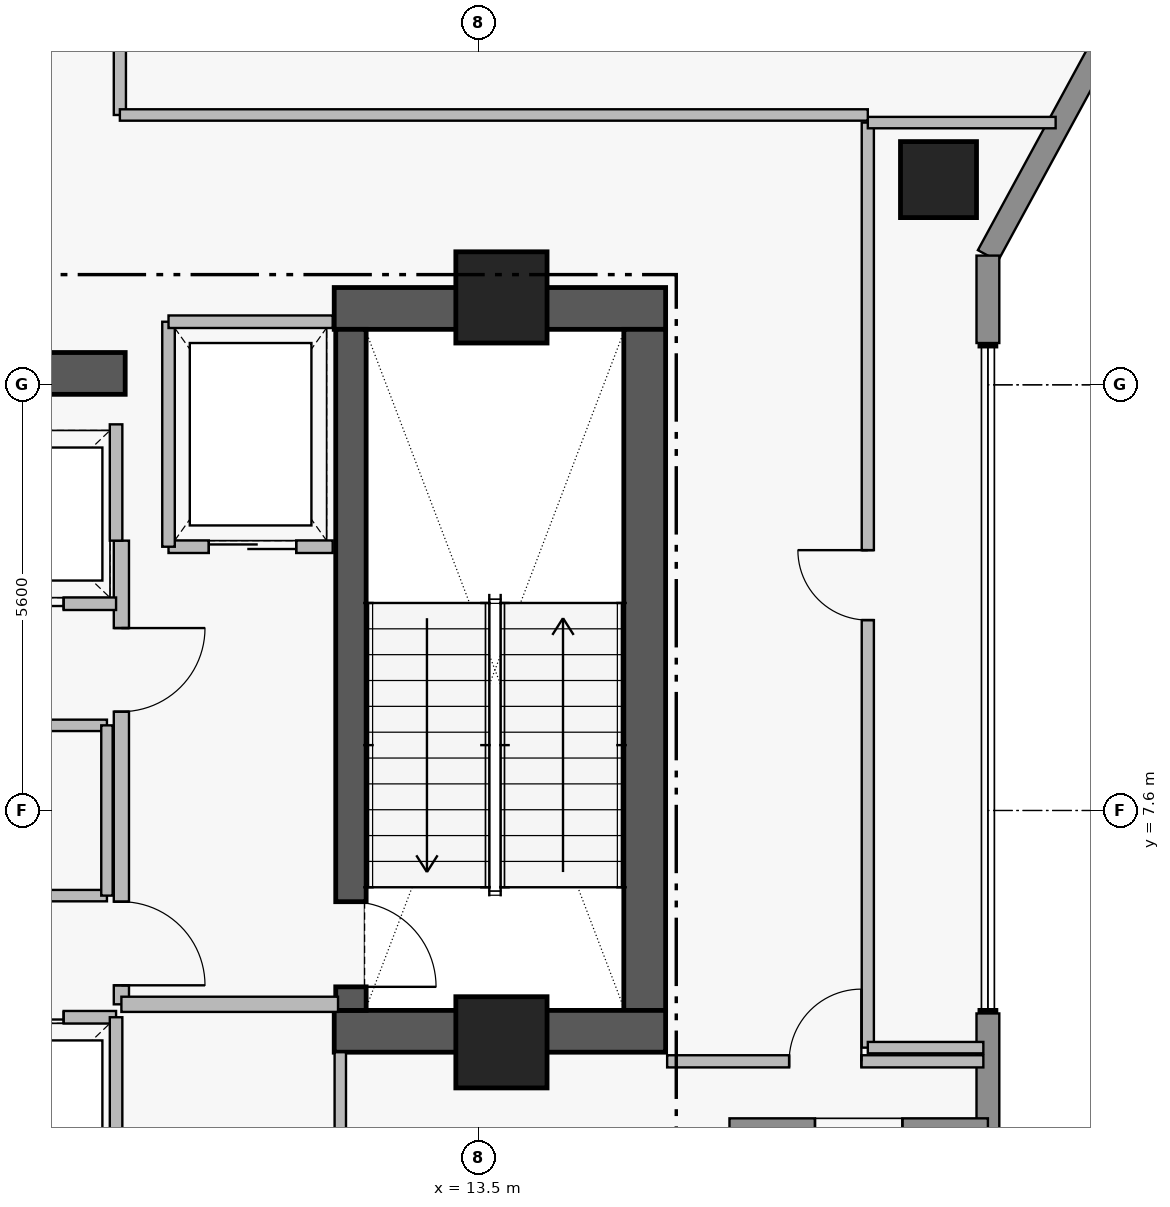
"""IFC4 building model, lengths in metres.
Left out: names, types, materials, properties, quantities, classifications, styles, units other than length and angle.
Written with IfcOpenShell. Run it as: python <this file> out.ifc"""

import sys

from ifc_helpers import new_model, si_unit, direction, frame, frame_2d, origin, origin_2d, place, context, subcontext, project, spatial, rectangle, extrude, element, fill, save


model = new_model("IFC4")
c1 = context("Model", 3, precision=1e-05, world=origin(), true_north=direction((0.0, 1.0)))
c2 = subcontext(c1, "Body", "Model", "MODEL_VIEW")
j1 = project(units=[si_unit("LENGTHUNIT", "METRE"), si_unit("PLANEANGLEUNIT", "RADIAN")], contexts=[c1])
p1 = place(None, origin())
s1 = spatial("IfcSite", under=j1, at=p1, CompositionType="ELEMENT")
p2 = place(p1, origin())
s2 = spatial("IfcBuilding", under=s1, at=p2, CompositionType="ELEMENT")
p3 = place(p2, frame((0.0, 0.0, 292.85)))
s3 = spatial("IfcBuildingStorey", under=s2, at=p3, CompositionType="ELEMENT", Elevation=292.85)
p4 = place(p3, frame((11.6, 14.205, 0.0), z_axis=(0.0, 0.0, 1.0), x_axis=(1.0, 0.0, 0.0)))
e1 = element("IfcWall", 1, at=p4, inside=s3, PredefinedType="SHEAR", context=c2, shape_type="SweptSolid", body=[
    extrude(rectangle(XDim=4.36, YDim=0.55, at=frame_2d((2.18, 0.0))), origin(), (0.0, 0.0, 1.0), 4.21),
])
p5 = place(p3, frame((15.685, 4.97, 0.0), z_axis=(0.0, 0.0, 1.0), x_axis=(0.0, 1.0, 0.0)))
e2 = element("IfcWall", 2, at=p5, inside=s3, PredefinedType="SHEAR", context=c2, shape_type="SweptSolid", body=[
    extrude(rectangle(XDim=8.96, YDim=0.55, at=frame_2d((4.48, 0.0))), origin(), (0.0, 0.0, 1.0), 4.21),
])
p6 = place(p3, frame((11.6, 4.695, 0.0), z_axis=(0.0, 0.0, 1.0), x_axis=(1.0, 0.0, 0.0)))
e3 = element("IfcWall", 3, at=p6, inside=s3, PredefinedType="SHEAR", context=c2, shape_type="SweptSolid", body=[
    extrude(rectangle(XDim=4.36, YDim=0.55, at=frame_2d((2.18, 0.0))), origin(), (0.0, 0.0, 1.0), 4.21),
])
p7 = place(p3, frame((1.25, 13.35, 0.0), z_axis=(0.0, 0.0, 1.0), x_axis=(1.0, 0.0, 0.0)))
e4 = element("IfcWall", 4, at=p7, inside=s3, PredefinedType="SHEAR", context=c2, shape_type="SweptSolid", body=[
    extrude(rectangle(XDim=7.6, YDim=0.55, at=frame_2d((3.8, 0.0))), origin(), (0.0, 0.0, 1.0), 4.16),
])
p8 = place(p3, frame((11.82, 13.93, 0.0), z_axis=(0.0, 0.0, 1.0), x_axis=(0.0, -1.0, 0.0)))
e5 = element("IfcWall", 5, at=p8, inside=s3, PredefinedType="SHEAR", context=c2, shape_type="SweptSolid", body=[
    extrude(rectangle(XDim=8.96, YDim=0.4, at=frame_2d((4.48, 0.0))), origin(), (0.0, 0.0, 1.0), 4.21),
])
p9 = place(p8, frame((7.53, 0.0, 0.0)))
e6 = element("IfcOpeningElement", 6, at=p9, cuts=e5, PredefinedType="OPENING", context=c2, shape_type="SweptSolid", body=[
    extrude(rectangle(XDim=1.12, YDim=2.22, at=frame_2d((0.56, 1.11))), frame((0.0, 0.21, 0.0), z_axis=(0.0, -1.0, 0.0), x_axis=(1.0, 0.0, 0.0)), (0.0, 0.0, 1.0), 0.42),
])
for number, where, z_axis, x_axis in (
    (7, (13.8, 14.35, 0.0), (0.0, 0.0, 1.0), (1.0, 0.0, 0.0)),
    (8, (13.8, 4.55, 0.0), (0.0, 0.0, 1.0), (1.0, 0.0, 0.0)),
):
    element("IfcColumn", number, at=place(p3, frame(where, z_axis=z_axis, x_axis=x_axis)), inside=s3, PredefinedType="COLUMN", context=c2, shape_type="SweptSolid", body=[
        extrude(rectangle(XDim=1.2, YDim=1.2, at=origin_2d()), origin(), (0.0, 0.0, 1.0), 4.4),
    ])
p10 = place(p3, frame((19.55, 15.9, 0.0), z_axis=(0.0, 0.0, 1.0), x_axis=(1.0, 0.0, 0.0)))
e9 = element("IfcColumn", 9, at=p10, inside=s3, PredefinedType="COLUMN", context=c2, shape_type="SweptSolid", body=[
    extrude(rectangle(XDim=1.0, YDim=1.0, at=origin_2d()), origin(), (0.0, 0.0, 1.0), 4.4),
])
p11 = place(p3, frame((22.7, 19.5, 0.0), z_axis=(0.0, 0.0, 1.0), x_axis=(-0.477505494629, -0.878628762675, 0.0)))
e10 = element("IfcWall", 10, at=p11, inside=s3, PredefinedType="STANDARD", context=c2, shape_type="SweptSolid", body=[
    extrude(rectangle(XDim=5.236, YDim=0.3, at=frame_2d((2.618, 0.0))), origin(), (0.0, 0.0, 1.0), 4.16),
])
p12 = place(p11, frame((1.051, 0.0, 1.25)))
e11 = element("IfcOpeningElement", 11, at=p12, cuts=e10, PredefinedType="OPENING", context=c2, shape_type="SweptSolid", body=[
    extrude(rectangle(XDim=1.15, YDim=1.55, at=frame_2d((0.575, 0.775))), frame((0.0, 0.16, 0.0), z_axis=(0.0, -1.0, 0.0), x_axis=(1.0, 0.0, 0.0)), (0.0, 0.0, 1.0), 0.32),
])
p13 = place(p3, frame((20.2, 14.9, 0.0), z_axis=(0.0, 0.0, 1.0), x_axis=(0.0, -1.0, 0.0)))
e12 = element("IfcWall", 12, at=p13, inside=s3, PredefinedType="STANDARD", context=c2, shape_type="SweptSolid", body=[
    extrude(rectangle(XDim=1.15, YDim=0.3, at=frame_2d((0.575, 0.0))), origin(), (0.0, 0.0, 1.0), 4.16),
])
p14 = place(p3, frame((20.2, 4.93, 0.0), z_axis=(0.0, 0.0, 1.0), x_axis=(0.0, -1.0, 0.0)))
e13 = element("IfcWall", 13, at=p14, inside=s3, PredefinedType="STANDARD", context=c2, shape_type="SweptSolid", body=[
    extrude(rectangle(XDim=1.53, YDim=0.3, at=frame_2d((0.765, 0.0))), origin(), (0.0, 0.0, 1.0), 4.16),
])
p15 = place(p3, frame((20.2, 3.4, 0.0), z_axis=(0.0, 0.0, 1.0), x_axis=(-1.0, 0.0, 0.0)))
e14 = element("IfcWall", 14, at=p15, inside=s3, PredefinedType="STANDARD", context=c2, shape_type="SweptSolid", body=[
    extrude(rectangle(XDim=3.4, YDim=0.3, at=frame_2d((1.7, 0.0))), origin(), (0.0, 0.0, 1.0), 4.16),
])
p16 = place(p15, frame((1.125, 0.0, 1.25)))
e15 = element("IfcOpeningElement", 15, at=p16, cuts=e14, PredefinedType="OPENING", context=c2, shape_type="SweptSolid", body=[
    extrude(rectangle(XDim=1.15, YDim=1.55, at=frame_2d((0.575, 0.775))), frame((0.0, 0.16, 0.0), z_axis=(0.0, -1.0, 0.0), x_axis=(1.0, 0.0, 0.0)), (0.0, 0.0, 1.0), 0.32),
])
p17 = place(p3, frame((8.8, 11.15, 0.0), z_axis=(0.0, 0.0, 1.0), x_axis=(0.0, -1.0, 0.0)))
e16 = element("IfcWall", 16, at=p17, inside=s3, PredefinedType="PARTITIONING", context=c2, shape_type="SweptSolid", body=[
    extrude(rectangle(XDim=6.1, YDim=0.2, at=frame_2d((3.05, 0.0))), origin(), (0.0, 0.0, 1.0), 4.16),
])
p18 = place(p17, frame((1.15, 0.0, 0.0)))
e17 = element("IfcOpeningElement", 17, at=p18, cuts=e16, PredefinedType="OPENING", context=c2, shape_type="SweptSolid", body=[
    extrude(rectangle(XDim=1.1, YDim=2.2, at=frame_2d((0.55, 1.1))), frame((0.0, 0.11, 0.0), z_axis=(0.0, -1.0, 0.0), x_axis=(1.0, 0.0, 0.0)), (0.0, 0.0, 1.0), 0.22),
])
p19 = place(p17, frame((4.75, 0.0, 0.0)))
e18 = element("IfcOpeningElement", 18, at=p19, cuts=e16, PredefinedType="OPENING", context=c2, shape_type="SweptSolid", body=[
    extrude(rectangle(XDim=1.1, YDim=2.2, at=frame_2d((0.55, 1.1))), frame((0.0, 0.11, 0.0), z_axis=(0.0, -1.0, 0.0), x_axis=(1.0, 0.0, 0.0)), (0.0, 0.0, 1.0), 0.22),
])
p20 = place(p3, frame((9.42, 11.07, 0.0), z_axis=(0.0, 0.0, 1.0), x_axis=(1.0, 0.0, 0.0)))
e19 = element("IfcWall", 19, at=p20, inside=s3, PredefinedType="PARTITIONING", context=c2, shape_type="SweptSolid", body=[
    extrude(rectangle(XDim=2.16, YDim=0.165, at=frame_2d((1.08, 0.0))), origin(), (0.0, 0.0, 1.0), 4.16),
])
p21 = place(p20, frame((0.53, 0.0, 0.0)))
e20 = element("IfcOpeningElement", 20, at=p21, cuts=e19, PredefinedType="OPENING", context=c2, shape_type="SweptSolid", body=[
    extrude(rectangle(XDim=1.15, YDim=2.25, at=frame_2d((0.575, 1.125))), frame((0.0, 0.093, 0.0), z_axis=(0.0, -1.0, 0.0), x_axis=(1.0, 0.0, 0.0)), (0.0, 0.0, 1.0), 0.185),
])
p22 = place(p3, frame((6.25, 4.88, 0.0), z_axis=(0.0, 0.0, 1.0), x_axis=(1.0, 0.0, 0.0)))
e21 = element("IfcWall", 21, at=p22, inside=s3, PredefinedType="PARTITIONING", context=c2, shape_type="SweptSolid", body=[
    extrude(rectangle(XDim=2.48, YDim=0.165, at=frame_2d((1.24, 0.0))), origin(), (0.0, 0.0, 1.0), 4.16),
])
p23 = place(p22, frame((0.69, 0.0, 0.0)))
e22 = element("IfcOpeningElement", 22, at=p23, cuts=e21, PredefinedType="OPENING", context=c2, shape_type="SweptSolid", body=[
    extrude(rectangle(XDim=1.1, YDim=2.25, at=frame_2d((0.55, 1.125))), frame((0.0, 0.093, 0.0), z_axis=(0.0, -1.0, 0.0), x_axis=(1.0, 0.0, 0.0)), (0.0, 0.0, 1.0), 0.185),
])
p24 = place(p3, frame((6.25, 10.32, 0.0), z_axis=(0.0, 0.0, 1.0), x_axis=(1.0, 0.0, 0.0)))
e23 = element("IfcWall", 23, at=p24, inside=s3, PredefinedType="PARTITIONING", context=c2, shape_type="SweptSolid", body=[
    extrude(rectangle(XDim=2.48, YDim=0.165, at=frame_2d((1.24, 0.0))), origin(), (0.0, 0.0, 1.0), 4.16),
])
p25 = place(p24, frame((0.69, 0.0, 0.0)))
e24 = element("IfcOpeningElement", 24, at=p25, cuts=e23, PredefinedType="OPENING", context=c2, shape_type="SweptSolid", body=[
    extrude(rectangle(XDim=1.1, YDim=2.25, at=frame_2d((0.55, 1.125))), frame((0.0, 0.093, 0.0), z_axis=(0.0, -1.0, 0.0), x_axis=(1.0, 0.0, 0.0)), (0.0, 0.0, 1.0), 0.185),
])
p26 = place(p3, frame((4.37, 6.48, 0.0), z_axis=(0.0, 0.0, 1.0), x_axis=(1.0, 0.0, 0.0)))
e25 = element("IfcWall", 25, at=p26, inside=s3, PredefinedType="PARTITIONING", context=c2, shape_type="SweptSolid", body=[
    extrude(rectangle(XDim=4.24, YDim=0.15, at=frame_2d((2.12, 0.0))), origin(), (0.0, 0.0, 1.0), 4.16),
])
p27 = place(p26, frame((1.67, 0.0, 0.0)))
e26 = element("IfcOpeningElement", 26, at=p27, cuts=e25, PredefinedType="OPENING", context=c2, shape_type="SweptSolid", body=[
    extrude(rectangle(XDim=0.9, YDim=2.15, at=frame_2d((0.45, 1.075))), frame((0.0, 0.085, 0.0), z_axis=(0.0, -1.0, 0.0), x_axis=(1.0, 0.0, 0.0)), (0.0, 0.0, 1.0), 0.17),
])
p28 = place(p3, frame((15.98, 4.3, 0.0), z_axis=(0.0, 0.0, 1.0), x_axis=(1.0, 0.0, 0.0)))
e27 = element("IfcWall", 27, at=p28, inside=s3, PredefinedType="PARTITIONING", context=c2, shape_type="SweptSolid", body=[
    extrude(rectangle(XDim=4.16, YDim=0.16, at=frame_2d((2.08, 0.0))), origin(), (0.0, 0.0, 1.0), 4.16),
])
p29 = place(p28, frame((1.605, 0.0, 0.0)))
e28 = element("IfcOpeningElement", 28, at=p29, cuts=e27, PredefinedType="OPENING", context=c2, shape_type="SweptSolid", body=[
    extrude(rectangle(XDim=0.95, YDim=2.15, at=frame_2d((0.475, 1.075))), frame((0.0, 0.09, 0.0), z_axis=(0.0, -1.0, 0.0), x_axis=(1.0, 0.0, 0.0)), (0.0, 0.0, 1.0), 0.18),
])
p30 = place(p3, frame((18.62, 4.48, 0.0), z_axis=(0.0, 0.0, 1.0), x_axis=(0.0, 1.0, 0.0)))
e29 = element("IfcWall", 29, at=p30, inside=s3, PredefinedType="PARTITIONING", context=c2, shape_type="SweptSolid", body=[
    extrude(rectangle(XDim=12.17, YDim=0.16, at=frame_2d((6.085, 0.0))), origin(), (0.0, 0.0, 1.0), 4.16),
])
p31 = place(p30, frame((5.625, 0.0, 0.0)))
e30 = element("IfcOpeningElement", 30, at=p31, cuts=e29, PredefinedType="OPENING", context=c2, shape_type="SweptSolid", body=[
    extrude(rectangle(XDim=0.92, YDim=2.12, at=frame_2d((0.46, 1.06))), frame((0.0, 0.09, 0.0), z_axis=(0.0, -1.0, 0.0), x_axis=(1.0, 0.0, 0.0)), (0.0, 0.0, 1.0), 0.18),
])
p32 = place(p3, frame((8.78, 16.75, 0.0), z_axis=(0.0, 0.0, 1.0), x_axis=(0.0, 1.0, 0.0)))
e31 = element("IfcWall", 31, at=p32, inside=s3, PredefinedType="PARTITIONING", context=c2, shape_type="SweptSolid", body=[
    extrude(rectangle(XDim=6.85, YDim=0.16, at=frame_2d((3.425, 0.0))), origin(), (0.0, 0.0, 1.0), 4.16),
])
p33 = place(p32, frame((2.885, 0.0, 0.0)))
e32 = element("IfcOpeningElement", 32, at=p33, cuts=e31, PredefinedType="OPENING", context=c2, shape_type="SweptSolid", body=[
    extrude(rectangle(XDim=1.08, YDim=2.18, at=frame_2d((0.54, 1.09))), frame((0.0, 0.09, 0.0), z_axis=(0.0, -1.0, 0.0), x_axis=(1.0, 0.0, 0.0)), (0.0, 0.0, 1.0), 0.18),
])
p34 = place(p3, frame((8.8, 5.05, 0.0), z_axis=(0.0, 0.0, 1.0), x_axis=(1.0, 0.0, 0.0)))
e33 = element("IfcWall", 33, at=p34, inside=s3, PredefinedType="PARTITIONING", context=c2, shape_type="SweptSolid", body=[
    extrude(rectangle(XDim=2.85, YDim=0.2, at=frame_2d((1.425, 0.0))), origin(), (0.0, 0.0, 1.0), 4.16),
])
p35 = place(p3, frame((9.42, 11.07, 0.0), z_axis=(0.0, 0.0, 1.0), x_axis=(0.0, 1.0, 0.0)))
e34 = element("IfcWall", 34, at=p35, inside=s3, PredefinedType="PARTITIONING", context=c2, shape_type="SweptSolid", body=[
    extrude(rectangle(XDim=2.96, YDim=0.165, at=frame_2d((1.48, 0.0))), origin(), (0.0, 0.0, 1.0), 4.16),
])
p36 = place(p3, frame((9.42, 14.03, 0.0), z_axis=(0.0, 0.0, 1.0), x_axis=(1.0, 0.0, 0.0)))
e35 = element("IfcWall", 35, at=p36, inside=s3, PredefinedType="PARTITIONING", context=c2, shape_type="SweptSolid", body=[
    extrude(rectangle(XDim=2.16, YDim=0.165, at=frame_2d((1.08, 0.0))), origin(), (0.0, 0.0, 1.0), 4.16),
])
p37 = place(p3, frame((8.73, 2.52, 0.0), z_axis=(0.0, 0.0, 1.0), x_axis=(0.0, 1.0, 0.0)))
e36 = element("IfcWall", 36, at=p37, inside=s3, PredefinedType="PARTITIONING", context=c2, shape_type="SweptSolid", body=[
    extrude(rectangle(XDim=2.36, YDim=0.165, at=frame_2d((1.18, 0.0))), origin(), (0.0, 0.0, 1.0), 4.16),
])
p38 = place(p3, frame((8.73, 11.15, 0.0), z_axis=(0.0, 0.0, 1.0), x_axis=(0.0, 1.0, 0.0)))
e37 = element("IfcWall", 37, at=p38, inside=s3, PredefinedType="PARTITIONING", context=c2, shape_type="SweptSolid", body=[
    extrude(rectangle(XDim=1.53, YDim=0.165, at=frame_2d((0.765, 0.0))), origin(), (0.0, 0.0, 1.0), 4.16),
])
p39 = place(p3, frame((4.37, 8.72, 0.0), z_axis=(0.0, 0.0, 1.0), x_axis=(1.0, 0.0, 0.0)))
e38 = element("IfcWall", 38, at=p39, inside=s3, PredefinedType="PARTITIONING", context=c2, shape_type="SweptSolid", body=[
    extrude(rectangle(XDim=4.24, YDim=0.15, at=frame_2d((2.12, 0.0))), origin(), (0.0, 0.0, 1.0), 4.16),
])
p40 = place(p3, frame((8.61, 6.48, 0.0), z_axis=(0.0, 0.0, 1.0), x_axis=(0.0, 1.0, 0.0)))
e39 = element("IfcWall", 39, at=p40, inside=s3, PredefinedType="PARTITIONING", context=c2, shape_type="SweptSolid", body=[
    extrude(rectangle(XDim=2.24, YDim=0.15, at=frame_2d((1.12, 0.0))), origin(), (0.0, 0.0, 1.0), 4.16),
])
p41 = place(p3, frame((11.68, 1.72, 0.0), z_axis=(0.0, 0.0, 1.0), x_axis=(0.0, 1.0, 0.0)))
e40 = element("IfcWall", 40, at=p41, inside=s3, PredefinedType="PARTITIONING", context=c2, shape_type="SweptSolid", body=[
    extrude(rectangle(XDim=2.7, YDim=0.15, at=frame_2d((1.35, 0.0))), origin(), (0.0, 0.0, 1.0), 4.16),
])
p42 = place(p3, frame((18.62, 4.48, 0.0), z_axis=(0.0, 0.0, 1.0), x_axis=(1.0, 0.0, 0.0)))
e41 = element("IfcWall", 41, at=p42, inside=s3, PredefinedType="PARTITIONING", context=c2, shape_type="SweptSolid", body=[
    extrude(rectangle(XDim=1.52, YDim=0.15, at=frame_2d((0.76, 0.0))), origin(), (0.0, 0.0, 1.0), 4.16),
])
p43 = place(p3, frame((18.62, 16.65, 0.0), z_axis=(0.0, 0.0, 1.0), x_axis=(1.0, 0.0, 0.0)))
e42 = element("IfcWall", 42, at=p43, inside=s3, PredefinedType="PARTITIONING", context=c2, shape_type="SweptSolid", body=[
    extrude(rectangle(XDim=2.471, YDim=0.15, at=frame_2d((1.235, 0.0))), origin(), (0.0, 0.0, 1.0), 4.16),
])
p44 = place(p3, frame((8.78, 16.75, 0.0), z_axis=(0.0, 0.0, 1.0), x_axis=(1.0, 0.0, 0.0)))
e43 = element("IfcWall", 43, at=p44, inside=s3, PredefinedType="PARTITIONING", context=c2, shape_type="SweptSolid", body=[
    extrude(rectangle(XDim=9.84, YDim=0.15, at=frame_2d((4.92, 0.0))), origin(), (0.0, 0.0, 1.0), 4.16),
])
p45 = place(p16, origin())
e44 = element("IfcWindow", 44, at=p45, inside=s3, PartitioningType="SINGLE_PANEL", PredefinedType="WINDOW", context=c2, shape_type="SweptSolid", body=[
    extrude(rectangle(XDim=1.15, YDim=1.55, at=frame_2d((0.575, 0.775))), frame((0.0, 0.03, 0.0), z_axis=(0.0, -1.0, 0.0), x_axis=(1.0, 0.0, 0.0)), (0.0, 0.0, 1.0), 0.06),
])
fill(e15, e44)
p46 = place(p9, origin())
e45 = element("IfcDoor", 45, at=p46, inside=s3, OperationType="SINGLE_SWING_RIGHT", PredefinedType="DOOR", context=c2, shape_type="SweptSolid", body=[
    extrude(rectangle(XDim=1.12, YDim=2.22, at=frame_2d((0.56, 1.11))), frame((0.0, 0.025, 0.0), z_axis=(0.0, -1.0, 0.0), x_axis=(1.0, 0.0, 0.0)), (0.0, 0.0, 1.0), 0.05),
])
fill(e6, e45)
p47 = place(p18, origin())
e46 = element("IfcDoor", 46, at=p47, inside=s3, OperationType="SINGLE_SWING_LEFT", PredefinedType="DOOR", context=c2, shape_type="SweptSolid", body=[
    extrude(rectangle(XDim=1.1, YDim=2.2, at=frame_2d((0.55, 1.1))), frame((0.0, 0.025, 0.0), z_axis=(0.0, -1.0, 0.0), x_axis=(1.0, 0.0, 0.0)), (0.0, 0.0, 1.0), 0.05),
])
fill(e17, e46)
p48 = place(p19, origin())
e47 = element("IfcDoor", 47, at=p48, inside=s3, OperationType="SINGLE_SWING_RIGHT", PredefinedType="DOOR", context=c2, shape_type="SweptSolid", body=[
    extrude(rectangle(XDim=1.1, YDim=2.2, at=frame_2d((0.55, 1.1))), frame((0.0, 0.025, 0.0), z_axis=(0.0, -1.0, 0.0), x_axis=(1.0, 0.0, 0.0)), (0.0, 0.0, 1.0), 0.05),
])
fill(e18, e47)
p49 = place(p21, origin())
e48 = element("IfcDoor", 48, at=p49, inside=s3, OperationType="SLIDING_TO_LEFT", PredefinedType="DOOR", context=c2, shape_type="SweptSolid", body=[
    extrude(rectangle(XDim=1.15, YDim=2.25, at=frame_2d((0.575, 1.125))), frame((0.0, 0.025, 0.0), z_axis=(0.0, -1.0, 0.0), x_axis=(1.0, 0.0, 0.0)), (0.0, 0.0, 1.0), 0.05),
])
fill(e20, e48)
p50 = place(p23, origin())
e49 = element("IfcDoor", 49, at=p50, inside=s3, OperationType="SLIDING_TO_LEFT", PredefinedType="DOOR", context=c2, shape_type="SweptSolid", body=[
    extrude(rectangle(XDim=1.1, YDim=2.25, at=frame_2d((0.55, 1.125))), frame((0.0, 0.025, 0.0), z_axis=(0.0, -1.0, 0.0), x_axis=(1.0, 0.0, 0.0)), (0.0, 0.0, 1.0), 0.05),
])
fill(e22, e49)
p51 = place(p25, origin())
e50 = element("IfcDoor", 50, at=p51, inside=s3, OperationType="SLIDING_TO_LEFT", PredefinedType="DOOR", context=c2, shape_type="SweptSolid", body=[
    extrude(rectangle(XDim=1.1, YDim=2.25, at=frame_2d((0.55, 1.125))), frame((0.0, 0.025, 0.0), z_axis=(0.0, -1.0, 0.0), x_axis=(1.0, 0.0, 0.0)), (0.0, 0.0, 1.0), 0.05),
])
fill(e24, e50)
p52 = place(p29, origin())
e51 = element("IfcDoor", 51, at=p52, inside=s3, OperationType="SINGLE_SWING_RIGHT", PredefinedType="DOOR", context=c2, shape_type="SweptSolid", body=[
    extrude(rectangle(XDim=0.95, YDim=2.15, at=frame_2d((0.475, 1.075))), frame((0.0, 0.025, 0.0), z_axis=(0.0, -1.0, 0.0), x_axis=(1.0, 0.0, 0.0)), (0.0, 0.0, 1.0), 0.05),
])
fill(e28, e51)
p53 = place(p31, origin())
e52 = element("IfcDoor", 52, at=p53, inside=s3, OperationType="SINGLE_SWING_RIGHT", PredefinedType="DOOR", context=c2, shape_type="SweptSolid", body=[
    extrude(rectangle(XDim=0.92, YDim=2.12, at=frame_2d((0.46, 1.06))), frame((0.0, 0.025, 0.0), z_axis=(0.0, -1.0, 0.0), x_axis=(1.0, 0.0, 0.0)), (0.0, 0.0, 1.0), 0.05),
])
fill(e30, e52)
save(model, sys.argv[1])
